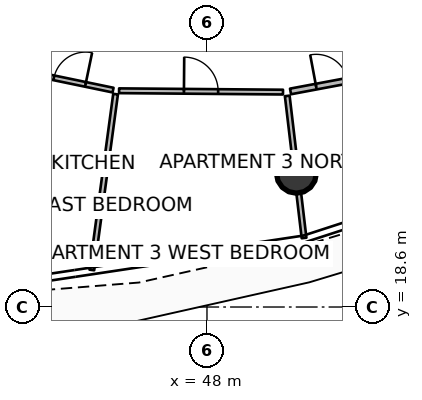
"""IFC4 building model, lengths in metres.
Left out: names, types, materials, properties, quantities, classifications, styles, units other than length and angle.
Written with IfcOpenShell. Run it as: python <this file> out.ifc"""

import sys

from ifc_helpers import new_model, si_unit, direction, frame, frame_2d, origin, origin_2d, place, context, subcontext, project, spatial, rectangle, circle, extrude, element, fill, save


model = new_model("IFC4")
c1 = context("Model", 3, precision=1e-05, world=origin(), true_north=direction((0.0, 1.0)))
c2 = subcontext(c1, "Body", "Model", "MODEL_VIEW")
j1 = project(units=[si_unit("LENGTHUNIT", "METRE"), si_unit("PLANEANGLEUNIT", "RADIAN")], contexts=[c1])
p1 = place(None, origin())
s1 = spatial("IfcSite", under=j1, at=p1, CompositionType="ELEMENT")
p2 = place(p1, origin())
s2 = spatial("IfcBuilding", under=s1, at=p2, CompositionType="ELEMENT")
p3 = place(p2, frame((0.0, 0.0, 127.8)))
s3 = spatial("IfcBuildingStorey", under=s2, at=p3, CompositionType="ELEMENT", Elevation=127.8)
p4 = place(p3, frame((50.353, 22.119, 0.0), z_axis=(0.0, 0.0, 1.0), x_axis=(1.0, 0.0, 0.0)))
e1 = element("IfcColumn", 1, at=p4, inside=s3, PredefinedType="COLUMN", context=c2, shape_type="SweptSolid", body=[
    extrude(circle(Radius=0.525, at=origin_2d()), origin(), (0.0, 0.0, 1.0), 3.5),
])
p5 = place(p3, frame((45.595, 24.202, 0.0), z_axis=(0.0, 0.0, 1.0), x_axis=(-0.133913732336, -0.990992993059, 0.0)))
e2 = element("IfcWall", 2, at=p5, inside=s3, PredefinedType="PARTITIONING", context=c2, shape_type="SweptSolid", body=[
    extrude(rectangle(XDim=4.669, YDim=0.125, at=frame_2d((2.334, 0.0))), origin(), (0.0, 0.0, 1.0), 2.94),
])
p6 = place(p3, frame((43.247, 24.781, 0.0), z_axis=(0.0, 0.0, 1.0), x_axis=(0.979144850172, -0.203163388388, 0.0)))
e3 = element("IfcWall", 3, at=p6, inside=s3, PredefinedType="PARTITIONING", context=c2, shape_type="SweptSolid", body=[
    extrude(rectangle(XDim=2.33, YDim=0.125, at=frame_2d((1.165, 0.0))), origin(), (0.0, 0.0, 1.0), 2.94),
])
p7 = place(p6, frame((0.74, 0.0, 0.0)))
e4 = element("IfcOpeningElement", 4, at=p7, cuts=e3, PredefinedType="OPENING", context=c2, shape_type="SweptSolid", body=[
    extrude(rectangle(XDim=0.85, YDim=2.06, at=frame_2d((0.425, 1.03))), frame((0.0, 0.073, 0.0), z_axis=(0.0, -1.0, 0.0), x_axis=(1.0, 0.0, 0.0)), (0.0, 0.0, 1.0), 0.145),
])
p8 = place(p3, frame((45.687, 24.29, 0.0), z_axis=(0.0, 0.0, 1.0), x_axis=(0.999965854942, -0.008263712844, 0.0)))
e5 = element("IfcWall", 5, at=p8, inside=s3, PredefinedType="PARTITIONING", context=c2, shape_type="SweptSolid", body=[
    extrude(rectangle(XDim=4.313, YDim=0.125, at=frame_2d((2.157, 0.0))), origin(), (0.0, 0.0, 1.0), 2.94),
])
p9 = place(p8, frame((1.707, 0.0, 0.0)))
e6 = element("IfcOpeningElement", 6, at=p9, cuts=e5, PredefinedType="OPENING", context=c2, shape_type="SweptSolid", body=[
    extrude(rectangle(XDim=0.9, YDim=2.08, at=frame_2d((0.45, 1.04))), frame((0.0, 0.073, 0.0), z_axis=(0.0, -1.0, 0.0), x_axis=(1.0, 0.0, 0.0)), (0.0, 0.0, 1.0), 0.145),
])
p10 = place(p3, frame((50.112, 24.155, 0.0), z_axis=(0.0, 0.0, 1.0), x_axis=(0.117510984651, -0.99307158276, 0.0)))
e7 = element("IfcWall", 7, at=p10, inside=s3, PredefinedType="PARTITIONING", context=c2, shape_type="SweptSolid", body=[
    extrude(rectangle(XDim=3.765, YDim=0.125, at=frame_2d((1.882, 0.0))), origin(), (0.0, 0.0, 1.0), 2.94),
])
p11 = place(p3, frame((50.199, 24.272, 0.0), z_axis=(0.0, 0.0, 1.0), x_axis=(0.982859747054, 0.184354868719, 0.0)))
e8 = element("IfcWall", 8, at=p11, inside=s3, PredefinedType="PARTITIONING", context=c2, shape_type="SweptSolid", body=[
    extrude(rectangle(XDim=2.222, YDim=0.15, at=frame_2d((1.111, 0.0))), origin(), (0.0, 0.0, 1.0), 2.94),
])
p12 = place(p11, frame((0.686, 0.0, 0.0)))
e9 = element("IfcOpeningElement", 9, at=p12, cuts=e8, PredefinedType="OPENING", context=c2, shape_type="SweptSolid", body=[
    extrude(rectangle(XDim=0.85, YDim=2.06, at=frame_2d((0.425, 1.03))), frame((0.0, 0.085, 0.0), z_axis=(0.0, -1.0, 0.0), x_axis=(1.0, 0.0, 0.0)), (0.0, 0.0, 1.0), 0.17),
])
p13 = place(p7, origin())
e10 = element("IfcDoor", 10, at=p13, inside=s3, OperationType="SINGLE_SWING_RIGHT", PredefinedType="DOOR", context=c2, shape_type="SweptSolid", body=[
    extrude(rectangle(XDim=0.85, YDim=2.06, at=frame_2d((0.425, 1.03))), frame((0.0, 0.025, 0.0), z_axis=(0.0, -1.0, 0.0), x_axis=(1.0, 0.0, 0.0)), (0.0, 0.0, 1.0), 0.05),
])
fill(e4, e10)
p14 = place(p9, origin())
e11 = element("IfcDoor", 11, at=p14, inside=s3, OperationType="SINGLE_SWING_LEFT", PredefinedType="DOOR", context=c2, shape_type="SweptSolid", body=[
    extrude(rectangle(XDim=0.9, YDim=2.08, at=frame_2d((0.45, 1.04))), frame((0.0, 0.025, 0.0), z_axis=(0.0, -1.0, 0.0), x_axis=(1.0, 0.0, 0.0)), (0.0, 0.0, 1.0), 0.05),
])
fill(e6, e11)
p15 = place(p12, origin())
e12 = element("IfcDoor", 12, at=p15, inside=s3, OperationType="SINGLE_SWING_LEFT", PredefinedType="DOOR", context=c2, shape_type="SweptSolid", body=[
    extrude(rectangle(XDim=0.85, YDim=2.06, at=frame_2d((0.425, 1.03))), frame((0.0, 0.025, 0.0), z_axis=(0.0, -1.0, 0.0), x_axis=(1.0, 0.0, 0.0)), (0.0, 0.0, 1.0), 0.05),
])
fill(e9, e12)
save(model, sys.argv[1])
